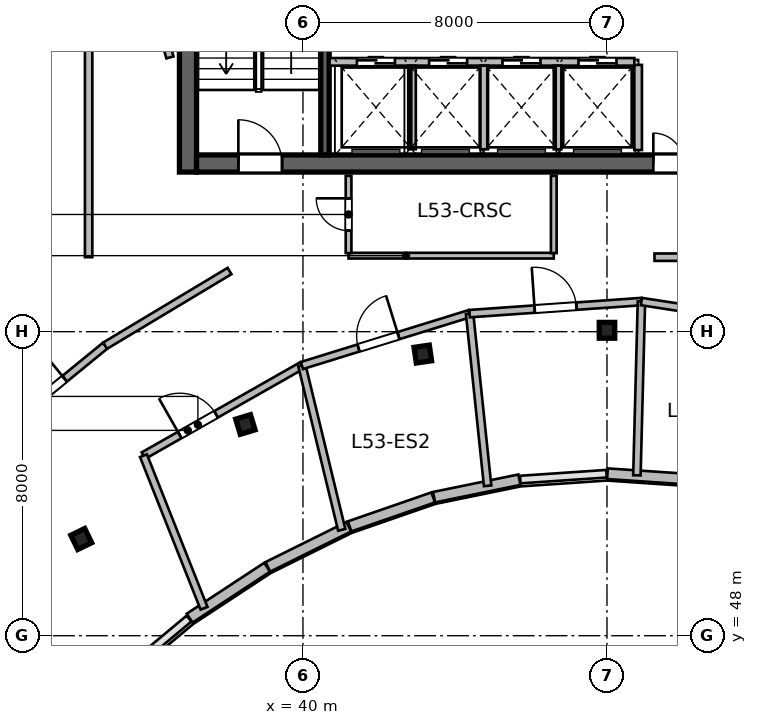
"""IFC4 building model, lengths in metres.
Left out: names, types, materials, properties, quantities, classifications, styles, units other than length and angle.
Written with IfcOpenShell. Run it as: python <this file> out.ifc"""

import sys

from ifc_helpers import new_model, si_unit, direction, frame, frame_2d, origin, origin_2d, place, context, subcontext, project, spatial, rectangle, i_section, extrude, source, transform, mapped, element, fill, save


model = new_model("IFC4")
c1 = context("Model", 3, precision=1e-05, world=origin(), true_north=direction((0.0, 1.0)))
c2 = subcontext(c1, "Body", "Model", "MODEL_VIEW")
j1 = project(units=[si_unit("LENGTHUNIT", "METRE"), si_unit("PLANEANGLEUNIT", "RADIAN")], contexts=[c1])
p1 = place(None, origin())
s1 = spatial("IfcSite", under=j1, at=p1, CompositionType="ELEMENT")
p2 = place(p1, origin())
s2 = spatial("IfcBuilding", under=s1, at=p2, CompositionType="ELEMENT")
p3 = place(p2, frame((0.0, 0.0, 219.6)))
s3 = spatial("IfcBuildingStorey", under=s2, at=p3, CompositionType="ELEMENT", Elevation=219.6)
m1 = source(origin(), c2, "Body", "SweptSolid", [
    extrude(rectangle(XDim=12.0, YDim=0.45, at=frame_2d((6.0, 0.0))), origin(), (0.0, 0.0, 1.0), 3.9),
])
p4 = place(p3, frame((36.975, 60.2, 0.0), z_axis=(0.0, 0.0, 1.0), x_axis=(0.0, 1.0, 0.0)))
e1 = element("IfcWall", 1, at=p4, inside=s3, PredefinedType="SHEAR", context=c2, shape_type="MappedRepresentation", body=[
    mapped(m1, transform((0.0, 0.0, 0.0), scale=1.0)),
])
m2 = source(origin(), c2, "Body", "SweptSolid", [
    extrude(rectangle(XDim=21.6, YDim=0.45, at=frame_2d((10.8, 0.0))), origin(), (0.0, 0.0, 1.0), 3.9),
])
p5 = place(p3, frame((37.2, 60.425, 0.0), z_axis=(0.0, 0.0, 1.0), x_axis=(1.0, 0.0, 0.0)))
e2 = element("IfcWall", 2, at=p5, inside=s3, PredefinedType="SHEAR", context=c2, shape_type="MappedRepresentation", body=[
    mapped(m2, transform((0.0, 0.0, 0.0), scale=1.0)),
])
p6 = place(p5, frame((1.1, 0.0, 0.0)))
e3 = element("IfcOpeningElement", 3, at=p6, cuts=e2, PredefinedType="OPENING", context=c2, shape_type="SweptSolid", body=[
    extrude(rectangle(XDim=1.15, YDim=2.15, at=frame_2d((0.575, 1.075))), frame((0.0, 0.235, 0.0), z_axis=(0.0, -1.0, 0.0), x_axis=(1.0, 0.0, 0.0)), (0.0, 0.0, 1.0), 0.47),
])
p7 = place(p5, frame((19.5, 0.0, 0.0)))
e4 = element("IfcOpeningElement", 4, at=p7, cuts=e2, PredefinedType="OPENING", context=c2, shape_type="SweptSolid", body=[
    extrude(rectangle(XDim=0.9, YDim=2.1, at=frame_2d((0.45, 1.05))), frame((0.0, 0.235, 0.0), z_axis=(0.0, -1.0, 0.0), x_axis=(1.0, 0.0, 0.0)), (0.0, 0.0, 1.0), 0.47),
])
p8 = place(p5, frame((12.02, 0.0, 0.0)))
e5 = element("IfcOpeningElement", 5, at=p8, cuts=e2, PredefinedType="OPENING", context=c2, shape_type="SweptSolid", body=[
    extrude(rectangle(XDim=1.6, YDim=2.15, at=frame_2d((0.8, 1.075))), frame((0.0, 0.235, 0.0), z_axis=(0.0, -1.0, 0.0), x_axis=(1.0, 0.0, 0.0)), (0.0, 0.0, 1.0), 0.47),
])
m3 = source(origin(), c2, "Body", "SweptSolid", [
    extrude(rectangle(XDim=11.1, YDim=0.22, at=frame_2d((5.55, 0.0))), origin(), (0.0, 0.0, 1.0), 3.9),
])
p9 = place(p3, frame((40.58, 60.65, 0.0), z_axis=(0.0, 0.0, 1.0), x_axis=(0.0, 1.0, 0.0)))
e6 = element("IfcWall", 6, at=p9, inside=s3, PredefinedType="SHEAR", context=c2, shape_type="MappedRepresentation", body=[
    mapped(m3, transform((0.0, 0.0, 0.0), scale=1.0)),
])
m4 = source(origin(), c2, "Body", "SweptSolid", [
    extrude(i_section(OverallWidth=0.406, OverallDepth=0.416, WebThickness=0.03, FlangeThickness=0.048, at=origin_2d()), origin(), (0.0, 0.0, 1.0), 3.9),
])
for number, where, z_axis, x_axis in (
    (7, (34.166, 50.545, 0.0), (0.0, 0.0, 1.0), (-0.436, 0.9, 0.0)),
    (8, (38.485, 53.558, 0.0), (0.0, 0.0, 1.0), (-0.289, 0.957, 0.0)),
    (9, (43.154, 55.411, 0.0), (0.0, 0.0, 1.0), (-0.143, 0.99, 0.0)),
    (10, (48.0, 56.036, 0.0), (0.0, 0.0, 1.0), (0.0, 1.0, 0.0)),
):
    element("IfcColumn", number, at=place(p3, frame(where, z_axis=z_axis, x_axis=x_axis)), inside=s3, PredefinedType="COLUMN", context=c2, shape_type="MappedRepresentation", body=[
        mapped(m4, transform((0.0, 0.0, 0.0), scale=1.0)),
    ])
m5 = source(origin(), c2, "Body", "SweptSolid", [
    extrude(rectangle(XDim=2.274, YDim=0.28, at=frame_2d((1.137, 0.0))), origin(), (0.0, 0.0, 1.0), 3.64),
])
p10 = place(p3, frame((50.281, 52.109, 0.0), z_axis=(0.0, 0.0, 1.0), x_axis=(-0.997702696995, 0.067744582138, 0.0)))
e11 = element("IfcWall", 11, at=p10, inside=s3, PredefinedType="SOLIDWALL", context=c2, shape_type="MappedRepresentation", body=[
    mapped(m5, transform((0.0, 0.0, 0.0), scale=1.0)),
])
m6 = source(origin(), c2, "Body", "SweptSolid", [
    extrude(rectangle(XDim=2.292, YDim=0.28, at=frame_2d((1.146, 0.0))), origin(), (0.0, 0.0, 1.0), 3.64),
])
p11 = place(p3, frame((45.695, 52.105, 0.0), z_axis=(0.0, 0.0, 1.0), x_axis=(-0.979635482689, -0.200784264963, 0.0)))
e12 = element("IfcWall", 12, at=p11, inside=s3, PredefinedType="SOLIDWALL", context=c2, shape_type="MappedRepresentation", body=[
    mapped(m6, transform((0.0, 0.0, 0.0), scale=1.0)),
])
m7 = source(origin(), c2, "Body", "SweptSolid", [
    extrude(rectangle(XDim=2.328, YDim=0.28, at=frame_2d((1.164, 0.0))), origin(), (0.0, 0.0, 1.0), 3.64),
])
p12 = place(p3, frame((43.427, 51.639, 0.0), z_axis=(0.0, 0.0, 1.0), x_axis=(-0.944872545641, -0.32743834915, 0.0)))
e13 = element("IfcWall", 13, at=p12, inside=s3, PredefinedType="SOLIDWALL", context=c2, shape_type="MappedRepresentation", body=[
    mapped(m7, transform((0.0, 0.0, 0.0), scale=1.0)),
])
m8 = source(origin(), c2, "Body", "SweptSolid", [
    extrude(rectangle(XDim=2.378, YDim=0.28, at=frame_2d((1.189, 0.0))), origin(), (0.0, 0.0, 1.0), 3.64),
])
p13 = place(p3, frame((41.207, 50.868, 0.0), z_axis=(0.0, 0.0, 1.0), x_axis=(-0.895941616831, -0.444171835252, 0.0)))
e14 = element("IfcWall", 14, at=p13, inside=s3, PredefinedType="SOLIDWALL", context=c2, shape_type="MappedRepresentation", body=[
    mapped(m8, transform((0.0, 0.0, 0.0), scale=1.0)),
])
m9 = source(origin(), c2, "Body", "SweptSolid", [
    extrude(rectangle(XDim=2.44, YDim=0.28, at=frame_2d((1.22, 0.0))), origin(), (0.0, 0.0, 1.0), 3.64),
])
p14 = place(p3, frame((39.057, 49.801, 0.0), z_axis=(0.0, 0.0, 1.0), x_axis=(-0.83598480459, -0.548752591333, 0.0)))
e15 = element("IfcWall", 15, at=p14, inside=s3, PredefinedType="SOLIDWALL", context=c2, shape_type="MappedRepresentation", body=[
    mapped(m9, transform((0.0, 0.0, 0.0), scale=1.0)),
])
m10 = source(origin(), c2, "Body", "SweptSolid", [
    extrude(rectangle(XDim=2.24, YDim=0.2, at=frame_2d((1.12, 0.0))), origin(), (0.0, 0.0, 1.0), 3.64),
])
p15 = place(p3, frame((48.82, 60.78, 0.0), z_axis=(0.0, 0.0, 1.0), x_axis=(0.0, 1.0, 0.0)))
e16 = element("IfcWall", 16, at=p15, inside=s3, PredefinedType="SOLIDWALL", context=c2, shape_type="MappedRepresentation", body=[
    mapped(m10, transform((0.0, 0.0, 0.0), scale=1.0)),
])
m11 = source(origin(), c2, "Body", "SweptSolid", [
    extrude(rectangle(XDim=8.02, YDim=0.2, at=frame_2d((4.01, 0.0))), origin(), (0.0, 0.0, 1.0), 3.64),
])
p16 = place(p3, frame((40.7, 63.1, 0.0), z_axis=(0.0, 0.0, 1.0), x_axis=(1.0, 0.0, 0.0)))
e17 = element("IfcWall", 17, at=p16, inside=s3, PredefinedType="SOLIDWALL", context=c2, shape_type="MappedRepresentation", body=[
    mapped(m11, transform((0.0, 0.0, 0.0), scale=1.0)),
])
p17 = place(p16, frame((0.72, 0.0, 0.0)))
e18 = element("IfcOpeningElement", 18, at=p17, cuts=e17, PredefinedType="OPENING", context=c2, shape_type="SweptSolid", body=[
    extrude(rectangle(XDim=1.0, YDim=2.15, at=frame_2d((0.5, 1.075))), frame((0.0, 0.11, 0.0), z_axis=(0.0, -1.0, 0.0), x_axis=(1.0, 0.0, 0.0)), (0.0, 0.0, 1.0), 0.22),
])
p18 = place(p16, frame((2.62, 0.0, 0.0)))
e19 = element("IfcOpeningElement", 19, at=p18, cuts=e17, PredefinedType="OPENING", context=c2, shape_type="SweptSolid", body=[
    extrude(rectangle(XDim=1.0, YDim=2.15, at=frame_2d((0.5, 1.075))), frame((0.0, 0.11, 0.0), z_axis=(0.0, -1.0, 0.0), x_axis=(1.0, 0.0, 0.0)), (0.0, 0.0, 1.0), 0.22),
])
p19 = place(p16, frame((4.55, 0.0, 0.0)))
e20 = element("IfcOpeningElement", 20, at=p19, cuts=e17, PredefinedType="OPENING", context=c2, shape_type="SweptSolid", body=[
    extrude(rectangle(XDim=1.0, YDim=2.15, at=frame_2d((0.5, 1.075))), frame((0.0, 0.11, 0.0), z_axis=(0.0, -1.0, 0.0), x_axis=(1.0, 0.0, 0.0)), (0.0, 0.0, 1.0), 0.22),
])
p20 = place(p16, frame((6.55, 0.0, 0.0)))
e21 = element("IfcOpeningElement", 21, at=p20, cuts=e17, PredefinedType="OPENING", context=c2, shape_type="SweptSolid", body=[
    extrude(rectangle(XDim=1.0, YDim=2.15, at=frame_2d((0.5, 1.075))), frame((0.0, 0.11, 0.0), z_axis=(0.0, -1.0, 0.0), x_axis=(1.0, 0.0, 0.0)), (0.0, 0.0, 1.0), 0.22),
])
m12 = source(origin(), c2, "Body", "SweptSolid", [
    extrude(rectangle(XDim=2.2, YDim=0.2, at=frame_2d((1.1, 0.0))), origin(), (0.0, 0.0, 1.0), 3.64),
])
for number, where, z_axis, x_axis in (
    (22, (42.87, 60.8, 0.0), (0.0, 0.0, 1.0), (0.0, 1.0, 0.0)),
    (23, (44.77, 60.8, 0.0), (0.0, 0.0, 1.0), (0.0, 1.0, 0.0)),
    (24, (46.7, 60.8, 0.0), (0.0, 0.0, 1.0), (0.0, 1.0, 0.0)),
):
    element("IfcWall", number, at=place(p3, frame(where, z_axis=z_axis, x_axis=x_axis)), inside=s3, PredefinedType="SOLIDWALL", context=c2, shape_type="MappedRepresentation", body=[
        mapped(m12, transform((0.0, 0.0, 0.0), scale=1.0)),
    ])
m13 = source(origin(), c2, "Body", "SweptSolid", [
    extrude(rectangle(XDim=5.4, YDim=0.15, at=frame_2d((2.7, 0.0))), origin(), (0.0, 0.0, 1.0), 3.64),
])
p21 = place(p3, frame((41.2, 58.0, 0.0), z_axis=(0.0, 0.0, 1.0), x_axis=(1.0, 0.0, 0.0)))
e25 = element("IfcWall", 25, at=p21, inside=s3, PredefinedType="PARTITIONING", context=c2, shape_type="MappedRepresentation", body=[
    mapped(m13, transform((0.0, 0.0, 0.0), scale=1.0)),
])
m14 = source(origin(), c2, "Body", "SweptSolid", [
    extrude(rectangle(XDim=2.033, YDim=0.15, at=frame_2d((1.016, 0.0))), origin(), (0.0, 0.0, 1.0), 3.64),
])
p22 = place(p3, frame((41.2, 58.067, 0.0), z_axis=(0.0, 0.0, 1.0), x_axis=(0.0, 1.0, 0.0)))
e26 = element("IfcWall", 26, at=p22, inside=s3, PredefinedType="PARTITIONING", context=c2, shape_type="MappedRepresentation", body=[
    mapped(m14, transform((0.0, 0.0, 0.0), scale=1.0)),
])
p23 = place(p22, frame((0.591, 0.0, 0.0)))
e27 = element("IfcOpeningElement", 27, at=p23, cuts=e26, PredefinedType="OPENING", context=c2, shape_type="SweptSolid", body=[
    extrude(rectangle(XDim=0.85, YDim=2.1, at=frame_2d((0.425, 1.05))), frame((0.0, 0.085, 0.0), z_axis=(0.0, -1.0, 0.0), x_axis=(1.0, 0.0, 0.0)), (0.0, 0.0, 1.0), 0.17),
])
p24 = place(p3, frame((46.6, 58.067, 0.0), z_axis=(0.0, 0.0, 1.0), x_axis=(0.0, 1.0, 0.0)))
e28 = element("IfcWall", 28, at=p24, inside=s3, PredefinedType="PARTITIONING", context=c2, shape_type="MappedRepresentation", body=[
    mapped(m14, transform((0.0, 0.0, 0.0), scale=1.0)),
])
m15 = source(origin(), c2, "Body", "SweptSolid", [
    extrude(rectangle(XDim=4.796, YDim=0.195, at=frame_2d((2.398, 0.0))), origin(), (0.0, 0.0, 1.0), 3.64),
])
p25 = place(p3, frame((35.803, 52.738, 0.0), z_axis=(0.0, 0.0, 1.0), x_axis=(0.869231352707, 0.494405557686, 0.0)))
e29 = element("IfcWall", 29, at=p25, inside=s3, PredefinedType="PARTITIONING", context=c2, shape_type="MappedRepresentation", body=[
    mapped(m15, transform((0.0, 0.0, 0.0), scale=1.0)),
])
p26 = place(p25, frame((1.098, 0.0, 0.0)))
e30 = element("IfcOpeningElement", 30, at=p26, cuts=e29, PredefinedType="OPENING", context=c2, shape_type="SweptSolid", body=[
    extrude(rectangle(XDim=1.1, YDim=2.15, at=frame_2d((0.55, 1.075))), frame((0.0, 0.107, 0.0), z_axis=(0.0, -1.0, 0.0), x_axis=(1.0, 0.0, 0.0)), (0.0, 0.0, 1.0), 0.215),
])
m16 = source(origin(), c2, "Body", "SweptSolid", [
    extrude(rectangle(XDim=4.32, YDim=0.195, at=frame_2d((2.16, 0.0))), origin(), (0.0, 0.0, 1.0), 3.64),
])
p27 = place(p3, frame((37.396, 48.723, 0.0), z_axis=(0.0, 0.0, 1.0), x_axis=(-0.368846295269, 0.929490403644, 0.0)))
e31 = element("IfcWall", 31, at=p27, inside=s3, PredefinedType="PARTITIONING", context=c2, shape_type="MappedRepresentation", body=[
    mapped(m16, transform((0.0, 0.0, 0.0), scale=1.0)),
])
m17 = source(origin(), c2, "Body", "SweptSolid", [
    extrude(rectangle(XDim=4.448, YDim=0.195, at=frame_2d((2.224, 0.0))), origin(), (0.0, 0.0, 1.0), 3.64),
])
p28 = place(p3, frame((41.02, 50.786, 0.0), z_axis=(0.0, 0.0, 1.0), x_axis=(-0.235672283469, 0.971832585791, 0.0)))
e32 = element("IfcWall", 32, at=p28, inside=s3, PredefinedType="PARTITIONING", context=c2, shape_type="MappedRepresentation", body=[
    mapped(m17, transform((0.0, 0.0, 0.0), scale=1.0)),
])
m18 = source(origin(), c2, "Body", "SweptSolid", [
    extrude(rectangle(XDim=4.619, YDim=0.195, at=frame_2d((2.31, 0.0))), origin(), (0.0, 0.0, 1.0), 3.64),
])
p29 = place(p3, frame((39.972, 55.109, 0.0), z_axis=(0.0, 0.0, 1.0), x_axis=(0.955335644135, 0.295522938274, 0.0)))
e33 = element("IfcWall", 33, at=p29, inside=s3, PredefinedType="PARTITIONING", context=c2, shape_type="MappedRepresentation", body=[
    mapped(m18, transform((0.0, 0.0, 0.0), scale=1.0)),
])
p30 = place(p29, frame((1.56, 0.0, 0.0)))
e34 = element("IfcOpeningElement", 34, at=p30, cuts=e33, PredefinedType="OPENING", context=c2, shape_type="SweptSolid", body=[
    extrude(rectangle(XDim=1.1, YDim=2.15, at=frame_2d((0.55, 1.075))), frame((0.0, 0.107, 0.0), z_axis=(0.0, -1.0, 0.0), x_axis=(1.0, 0.0, 0.0)), (0.0, 0.0, 1.0), 0.215),
])
m19 = source(origin(), c2, "Body", "SweptSolid", [
    extrude(rectangle(XDim=4.555, YDim=0.195, at=frame_2d((2.278, 0.0))), origin(), (0.0, 0.0, 1.0), 3.64),
])
p31 = place(p3, frame((44.859, 51.944, 0.0), z_axis=(0.0, 0.0, 1.0), x_axis=(-0.104299759329, 0.994545906534, 0.0)))
e35 = element("IfcWall", 35, at=p31, inside=s3, PredefinedType="PARTITIONING", context=c2, shape_type="MappedRepresentation", body=[
    mapped(m19, transform((0.0, 0.0, 0.0), scale=1.0)),
])
m20 = source(origin(), c2, "Body", "SweptSolid", [
    extrude(rectangle(XDim=4.534, YDim=0.195, at=frame_2d((2.267, 0.0))), origin(), (0.0, 0.0, 1.0), 3.64),
])
p32 = place(p3, frame((44.384, 56.474, 0.0), z_axis=(0.0, 0.0, 1.0), x_axis=(0.997542735031, 0.070060629361, 0.0)))
e36 = element("IfcWall", 36, at=p32, inside=s3, PredefinedType="PARTITIONING", context=c2, shape_type="MappedRepresentation", body=[
    mapped(m20, transform((0.0, 0.0, 0.0), scale=1.0)),
])
p33 = place(p32, frame((1.717, 0.0, 0.0)))
e37 = element("IfcOpeningElement", 37, at=p33, cuts=e36, PredefinedType="OPENING", context=c2, shape_type="SweptSolid", body=[
    extrude(rectangle(XDim=1.1, YDim=2.15, at=frame_2d((0.55, 1.075))), frame((0.0, 0.107, 0.0), z_axis=(0.0, -1.0, 0.0), x_axis=(1.0, 0.0, 0.0)), (0.0, 0.0, 1.0), 0.215),
])
m21 = source(origin(), c2, "Body", "SweptSolid", [
    extrude(rectangle(XDim=4.573, YDim=0.195, at=frame_2d((2.287, 0.0))), origin(), (0.0, 0.0, 1.0), 3.64),
])
p34 = place(p3, frame((48.788, 52.22, 0.0), z_axis=(0.0, 0.0, 1.0), x_axis=(0.026049788838, 0.99966064667, 0.0)))
e38 = element("IfcWall", 38, at=p34, inside=s3, PredefinedType="PARTITIONING", context=c2, shape_type="MappedRepresentation", body=[
    mapped(m21, transform((0.0, 0.0, 0.0), scale=1.0)),
])
m22 = source(origin(), c2, "Body", "SweptSolid", [
    extrude(rectangle(XDim=4.097, YDim=0.195, at=frame_2d((2.049, 0.0))), origin(), (0.0, 0.0, 1.0), 3.64),
])
p35 = place(p3, frame((48.907, 56.792, 0.0), z_axis=(0.0, 0.0, 1.0), x_axis=(0.988545320847, -0.150924314249, 0.0)))
e39 = element("IfcWall", 39, at=p35, inside=s3, PredefinedType="PARTITIONING", context=c2, shape_type="MappedRepresentation", body=[
    mapped(m22, transform((0.0, 0.0, 0.0), scale=1.0)),
])
p36 = place(p35, frame((1.499, 0.0, 0.0)))
e40 = element("IfcOpeningElement", 40, at=p36, cuts=e39, PredefinedType="OPENING", context=c2, shape_type="SweptSolid", body=[
    extrude(rectangle(XDim=1.1, YDim=2.15, at=frame_2d((0.55, 1.075))), frame((0.0, 0.107, 0.0), z_axis=(0.0, -1.0, 0.0), x_axis=(1.0, 0.0, 0.0)), (0.0, 0.0, 1.0), 0.215),
])
m23 = source(origin(), c2, "Body", "SweptSolid", [
    extrude(rectangle(XDim=3.954, YDim=0.195, at=frame_2d((1.977, 0.0))), origin(), (0.0, 0.0, 1.0), 3.64),
])
p37 = place(p3, frame((31.733, 53.13, 0.0), z_axis=(0.0, 0.0, 1.0), x_axis=(0.774345047596, 0.632763579281, 0.0)))
e41 = element("IfcWall", 41, at=p37, inside=s3, PredefinedType="PARTITIONING", context=c2, shape_type="MappedRepresentation", body=[
    mapped(m23, transform((0.0, 0.0, 0.0), scale=1.0)),
])
p38 = place(p37, frame((1.377, 0.0, 0.0)))
e42 = element("IfcOpeningElement", 42, at=p38, cuts=e41, PredefinedType="OPENING", context=c2, shape_type="SweptSolid", body=[
    extrude(rectangle(XDim=1.2, YDim=2.15, at=frame_2d((0.6, 1.075))), frame((0.0, 0.107, 0.0), z_axis=(0.0, -1.0, 0.0), x_axis=(1.0, 0.0, 0.0)), (0.0, 0.0, 1.0), 0.215),
])
m24 = source(origin(), c2, "Body", "SweptSolid", [
    extrude(rectangle(XDim=3.817, YDim=0.195, at=frame_2d((1.909, 0.0))), origin(), (0.0, 0.0, 1.0), 3.64),
])
p39 = place(p3, frame((34.795, 55.632, 0.0), z_axis=(0.0, 0.0, 1.0), x_axis=(0.857453418218, 0.514561595522, 0.0)))
e43 = element("IfcWall", 43, at=p39, inside=s3, PredefinedType="PARTITIONING", context=c2, shape_type="MappedRepresentation", body=[
    mapped(m24, transform((0.0, 0.0, 0.0), scale=1.0)),
])
m25 = source(origin(), c2, "Body", "SweptSolid", [
    extrude(rectangle(XDim=13.694, YDim=0.195, at=frame_2d((6.847, 0.0))), origin(), (0.0, 0.0, 1.0), 3.64),
])
p40 = place(p3, frame((36.5, 63.216, 0.0), z_axis=(0.0, 0.0, 1.0), x_axis=(-0.268753576604, 0.963208967495, 0.0)))
e44 = element("IfcWall", 44, at=p40, inside=s3, PredefinedType="PARTITIONING", context=c2, shape_type="MappedRepresentation", body=[
    mapped(m25, transform((0.0, 0.0, 0.0), scale=1.0)),
])
m26 = source(origin(), c2, "Body", "SweptSolid", [
    extrude(rectangle(XDim=19.209, YDim=0.195, at=frame_2d((9.604, 0.0))), origin(), (0.0, 0.0, 1.0), 3.64),
])
p41 = place(p3, frame((34.36, 57.96, 0.0), z_axis=(0.0, 0.0, 1.0), x_axis=(0.0, 1.0, 0.0)))
e45 = element("IfcWall", 45, at=p41, inside=s3, PredefinedType="PARTITIONING", context=c2, shape_type="MappedRepresentation", body=[
    mapped(m26, transform((0.0, 0.0, 0.0), scale=1.0)),
])
m27 = source(origin(), c2, "Body", "SweptSolid", [
    extrude(rectangle(XDim=12.39, YDim=0.195, at=frame_2d((6.195, 0.0))), origin(), (0.0, 0.0, 1.0), 3.64),
])
p42 = place(p3, frame((49.25, 57.96, 0.0), z_axis=(0.0, 0.0, 1.0), x_axis=(1.0, 0.0, 0.0)))
e46 = element("IfcWall", 46, at=p42, inside=s3, PredefinedType="PARTITIONING", context=c2, shape_type="MappedRepresentation", body=[
    mapped(m27, transform((0.0, 0.0, 0.0), scale=1.0)),
])
m28 = source(origin(), c2, "Body", "SweptSolid", [
    extrude(rectangle(XDim=1.15, YDim=2.15, at=frame_2d((0.575, 1.075))), frame((0.0, 0.025, 0.0), z_axis=(0.0, -1.0, 0.0), x_axis=(1.0, 0.0, 0.0)), (0.0, 0.0, 1.0), 0.05),
])
p43 = place(p6, origin())
e47 = element("IfcDoor", 47, at=p43, inside=s3, OperationType="SINGLE_SWING_LEFT", PredefinedType="DOOR", context=c2, shape_type="MappedRepresentation", body=[
    mapped(m28, transform((0.0, 0.0, 0.0), scale=1.0)),
])
fill(e3, e47)
m29 = source(origin(), c2, "Body", "SweptSolid", [
    extrude(rectangle(XDim=1.6, YDim=2.15, at=frame_2d((0.8, 1.075))), frame((0.0, 0.025, 0.0), z_axis=(0.0, -1.0, 0.0), x_axis=(1.0, 0.0, 0.0)), (0.0, 0.0, 1.0), 0.05),
])
p44 = place(p8, origin())
e48 = element("IfcDoor", 48, at=p44, inside=s3, OperationType="DOUBLE_DOOR_SINGLE_SWING", PredefinedType="DOOR", context=c2, shape_type="MappedRepresentation", body=[
    mapped(m29, transform((0.0, 0.0, 0.0), scale=1.0)),
])
fill(e5, e48)
m30 = source(origin(), c2, "Body", "SweptSolid", [
    extrude(rectangle(XDim=1.0, YDim=2.15, at=frame_2d((0.5, 1.075))), frame((0.0, 0.025, 0.0), z_axis=(0.0, -1.0, 0.0), x_axis=(1.0, 0.0, 0.0)), (0.0, 0.0, 1.0), 0.05),
])
p45 = place(p17, origin())
e49 = element("IfcDoor", 49, at=p45, inside=s3, OperationType="DOUBLE_DOOR_SLIDING", PredefinedType="DOOR", context=c2, shape_type="MappedRepresentation", body=[
    mapped(m30, transform((0.0, 0.0, 0.0), scale=1.0)),
])
fill(e18, e49)
p46 = place(p18, origin())
e50 = element("IfcDoor", 50, at=p46, inside=s3, OperationType="DOUBLE_DOOR_SLIDING", PredefinedType="DOOR", context=c2, shape_type="MappedRepresentation", body=[
    mapped(m30, transform((0.0, 0.0, 0.0), scale=1.0)),
])
fill(e19, e50)
p47 = place(p19, origin())
e51 = element("IfcDoor", 51, at=p47, inside=s3, OperationType="DOUBLE_DOOR_SLIDING", PredefinedType="DOOR", context=c2, shape_type="MappedRepresentation", body=[
    mapped(m30, transform((0.0, 0.0, 0.0), scale=1.0)),
])
fill(e20, e51)
p48 = place(p20, origin())
e52 = element("IfcDoor", 52, at=p48, inside=s3, OperationType="DOUBLE_DOOR_SLIDING", PredefinedType="DOOR", context=c2, shape_type="MappedRepresentation", body=[
    mapped(m30, transform((0.0, 0.0, 0.0), scale=1.0)),
])
fill(e21, e52)
m31 = source(origin(), c2, "Body", "SweptSolid", [
    extrude(rectangle(XDim=0.85, YDim=2.1, at=frame_2d((0.425, 1.05))), frame((0.0, 0.025, 0.0), z_axis=(0.0, -1.0, 0.0), x_axis=(1.0, 0.0, 0.0)), (0.0, 0.0, 1.0), 0.05),
])
p49 = place(p23, origin())
e53 = element("IfcDoor", 53, at=p49, inside=s3, OperationType="SINGLE_SWING_RIGHT", PredefinedType="DOOR", context=c2, shape_type="MappedRepresentation", body=[
    mapped(m31, transform((0.0, 0.0, 0.0), scale=1.0)),
])
fill(e27, e53)
m32 = source(origin(), c2, "Body", "SweptSolid", [
    extrude(rectangle(XDim=1.1, YDim=2.15, at=frame_2d((0.55, 1.075))), frame((0.0, 0.025, 0.0), z_axis=(0.0, -1.0, 0.0), x_axis=(1.0, 0.0, 0.0)), (0.0, 0.0, 1.0), 0.05),
])
p50 = place(p26, origin())
e54 = element("IfcDoor", 54, at=p50, inside=s3, OperationType="SINGLE_SWING_LEFT", PredefinedType="DOOR", context=c2, shape_type="MappedRepresentation", body=[
    mapped(m32, transform((0.0, 0.0, 0.0), scale=1.0)),
])
fill(e30, e54)
p51 = place(p30, origin())
e55 = element("IfcDoor", 55, at=p51, inside=s3, OperationType="SINGLE_SWING_RIGHT", PredefinedType="DOOR", context=c2, shape_type="MappedRepresentation", body=[
    mapped(m32, transform((0.0, 0.0, 0.0), scale=1.0)),
])
fill(e34, e55)
p52 = place(p33, origin())
e56 = element("IfcDoor", 56, at=p52, inside=s3, OperationType="SINGLE_SWING_LEFT", PredefinedType="DOOR", context=c2, shape_type="MappedRepresentation", body=[
    mapped(m32, transform((0.0, 0.0, 0.0), scale=1.0)),
])
fill(e37, e56)
m33 = source(origin(), c2, "Body", "SweptSolid", [
    extrude(rectangle(XDim=1.2, YDim=2.15, at=frame_2d((0.6, 1.075))), frame((0.0, 0.025, 0.0), z_axis=(0.0, -1.0, 0.0), x_axis=(1.0, 0.0, 0.0)), (0.0, 0.0, 1.0), 0.05),
])
p53 = place(p38, origin())
e57 = element("IfcDoor", 57, at=p53, inside=s3, OperationType="SINGLE_SWING_RIGHT", PredefinedType="DOOR", context=c2, shape_type="MappedRepresentation", body=[
    mapped(m33, transform((0.0, 0.0, 0.0), scale=1.0)),
])
fill(e42, e57)
save(model, sys.argv[1])
